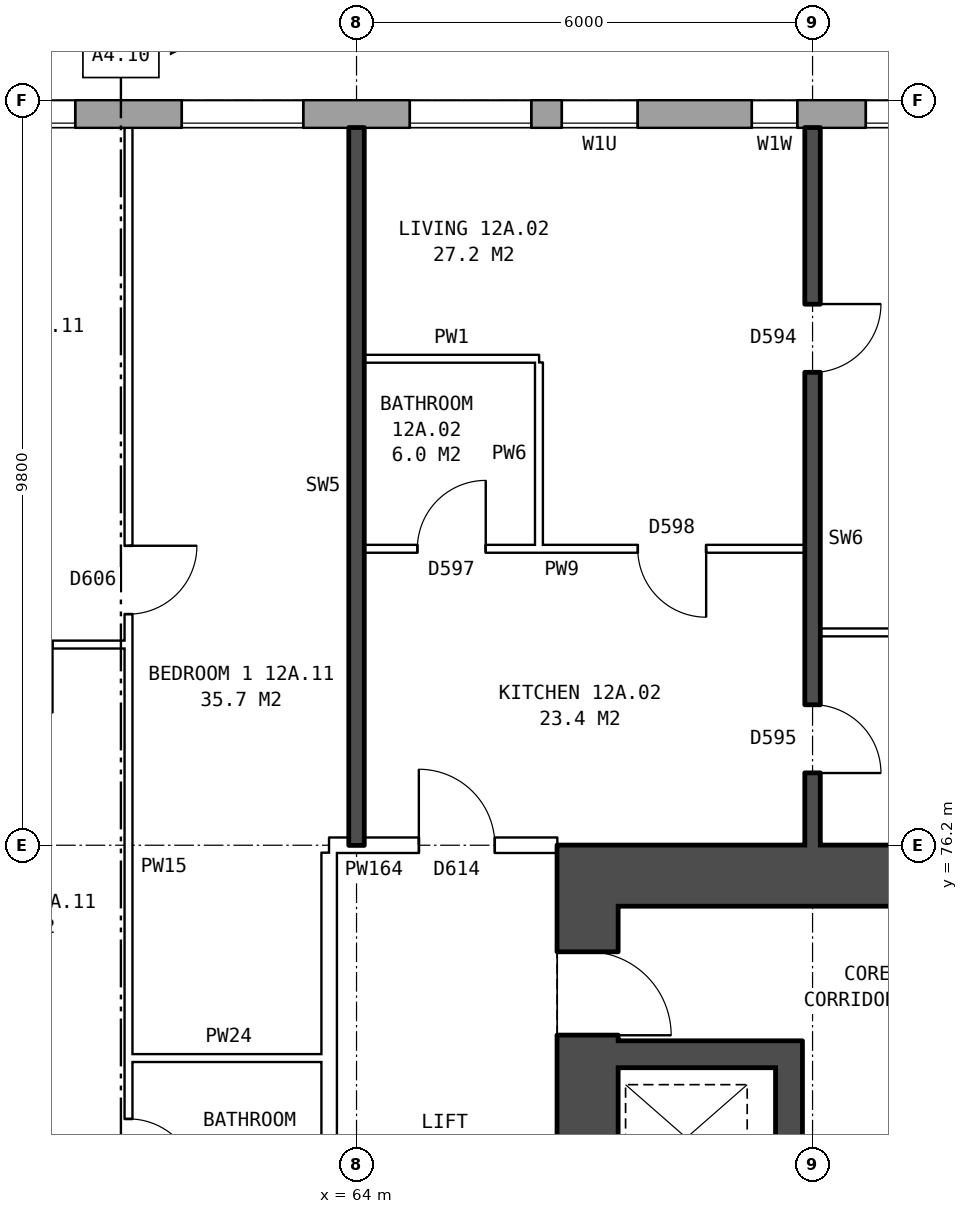
"""IFC4 building model, lengths in metres.
Left out: names, types, materials, properties, quantities, classifications, styles, units other than length and angle.
Written with IfcOpenShell. Run it as: python <this file> out.ifc"""

import sys

from ifc_helpers import new_model, si_unit, direction, frame, frame_2d, origin, place, context, subcontext, project, spatial, rectangle, extrude, element, fill, save


model = new_model("IFC4")
c1 = context("Model", 3, precision=1e-05, world=origin(), true_north=direction((0.0, 1.0)))
c2 = subcontext(c1, "Body", "Model", "MODEL_VIEW")
j1 = project(units=[si_unit("LENGTHUNIT", "METRE"), si_unit("PLANEANGLEUNIT", "RADIAN")], contexts=[c1])
p1 = place(None, origin())
s1 = spatial("IfcSite", under=j1, at=p1, CompositionType="ELEMENT")
p2 = place(p1, origin())
s2 = spatial("IfcBuilding", under=s1, at=p2, CompositionType="ELEMENT")
p3 = place(p2, frame((0.0, 0.0, 47.4)))
s3 = spatial("IfcBuildingStorey", under=s2, at=p3, CompositionType="ELEMENT", Elevation=47.4)
p4 = place(p3, frame((72.925, 85.82, 0.0), z_axis=(0.0, 0.0, 1.0), x_axis=(-1.0, 0.0, 0.0)))
e1 = element("IfcWall", 1, at=p4, inside=s3, PredefinedType="STANDARD", context=c2, shape_type="SweptSolid", body=[
    extrude(rectangle(XDim=48.351, YDim=0.36, at=frame_2d((24.175, 0.0))), origin(), (0.0, 0.0, 1.0), 2.85),
])
p5 = place(p4, frame((0.625, 0.0, 0.8)))
e2 = element("IfcOpeningElement", 2, at=p5, cuts=e1, PredefinedType="OPENING", context=c2, shape_type="SweptSolid", body=[
    extrude(rectangle(XDim=1.6, YDim=1.8, at=frame_2d((0.8, 0.9))), frame((0.0, 0.19, 0.0), z_axis=(0.0, -1.0, 0.0), x_axis=(1.0, 0.0, 0.0)), (0.0, 0.0, 1.0), 0.38),
])
p6 = place(p4, frame((3.125, 0.0, 1.7)))
e3 = element("IfcOpeningElement", 3, at=p6, cuts=e1, PredefinedType="OPENING", context=c2, shape_type="SweptSolid", body=[
    extrude(rectangle(XDim=0.6, YDim=0.9, at=frame_2d((0.3, 0.45))), frame((0.0, 0.19, 0.0), z_axis=(0.0, -1.0, 0.0), x_axis=(1.0, 0.0, 0.0)), (0.0, 0.0, 1.0), 0.38),
])
p7 = place(p4, frame((6.625, 0.0, 0.8)))
e4 = element("IfcOpeningElement", 4, at=p7, cuts=e1, PredefinedType="OPENING", context=c2, shape_type="SweptSolid", body=[
    extrude(rectangle(XDim=1.6, YDim=1.8, at=frame_2d((0.8, 0.9))), frame((0.0, 0.19, 0.0), z_axis=(0.0, -1.0, 0.0), x_axis=(1.0, 0.0, 0.0)), (0.0, 0.0, 1.0), 0.38),
])
p8 = place(p4, frame((9.625, 0.0, 0.8)))
e5 = element("IfcOpeningElement", 5, at=p8, cuts=e1, PredefinedType="OPENING", context=c2, shape_type="SweptSolid", body=[
    extrude(rectangle(XDim=1.6, YDim=1.8, at=frame_2d((0.8, 0.9))), frame((0.0, 0.19, 0.0), z_axis=(0.0, -1.0, 0.0), x_axis=(1.0, 0.0, 0.0)), (0.0, 0.0, 1.0), 0.38),
])
p9 = place(p4, frame((12.625, 0.0, 0.8)))
e6 = element("IfcOpeningElement", 6, at=p9, cuts=e1, PredefinedType="OPENING", context=c2, shape_type="SweptSolid", body=[
    extrude(rectangle(XDim=1.6, YDim=1.8, at=frame_2d((0.8, 0.9))), frame((0.0, 0.19, 0.0), z_axis=(0.0, -1.0, 0.0), x_axis=(1.0, 0.0, 0.0)), (0.0, 0.0, 1.0), 0.38),
])
p10 = place(p4, frame((15.625, 0.0, 0.8)))
e7 = element("IfcOpeningElement", 7, at=p10, cuts=e1, PredefinedType="OPENING", context=c2, shape_type="SweptSolid", body=[
    extrude(rectangle(XDim=1.6, YDim=1.8, at=frame_2d((0.8, 0.9))), frame((0.0, 0.19, 0.0), z_axis=(0.0, -1.0, 0.0), x_axis=(1.0, 0.0, 0.0)), (0.0, 0.0, 1.0), 0.38),
])
p11 = place(p4, frame((18.625, 0.0, 0.8)))
e8 = element("IfcOpeningElement", 8, at=p11, cuts=e1, PredefinedType="OPENING", context=c2, shape_type="SweptSolid", body=[
    extrude(rectangle(XDim=1.6, YDim=1.8, at=frame_2d((0.8, 0.9))), frame((0.0, 0.19, 0.0), z_axis=(0.0, -1.0, 0.0), x_axis=(1.0, 0.0, 0.0)), (0.0, 0.0, 1.0), 0.38),
])
p12 = place(p4, frame((21.625, 0.0, 0.8)))
e9 = element("IfcOpeningElement", 9, at=p12, cuts=e1, PredefinedType="OPENING", context=c2, shape_type="SweptSolid", body=[
    extrude(rectangle(XDim=1.6, YDim=1.8, at=frame_2d((0.8, 0.9))), frame((0.0, 0.19, 0.0), z_axis=(0.0, -1.0, 0.0), x_axis=(1.0, 0.0, 0.0)), (0.0, 0.0, 1.0), 0.38),
])
p13 = place(p4, frame((24.625, 0.0, 0.8)))
e10 = element("IfcOpeningElement", 10, at=p13, cuts=e1, PredefinedType="OPENING", context=c2, shape_type="SweptSolid", body=[
    extrude(rectangle(XDim=1.6, YDim=1.8, at=frame_2d((0.8, 0.9))), frame((0.0, 0.19, 0.0), z_axis=(0.0, -1.0, 0.0), x_axis=(1.0, 0.0, 0.0)), (0.0, 0.0, 1.0), 0.38),
])
p14 = place(p4, frame((27.625, 0.0, 0.8)))
e11 = element("IfcOpeningElement", 11, at=p14, cuts=e1, PredefinedType="OPENING", context=c2, shape_type="SweptSolid", body=[
    extrude(rectangle(XDim=1.6, YDim=1.8, at=frame_2d((0.8, 0.9))), frame((0.0, 0.19, 0.0), z_axis=(0.0, -1.0, 0.0), x_axis=(1.0, 0.0, 0.0)), (0.0, 0.0, 1.0), 0.38),
])
p15 = place(p4, frame((30.625, 0.0, 0.8)))
e12 = element("IfcOpeningElement", 12, at=p15, cuts=e1, PredefinedType="OPENING", context=c2, shape_type="SweptSolid", body=[
    extrude(rectangle(XDim=1.6, YDim=1.8, at=frame_2d((0.8, 0.9))), frame((0.0, 0.19, 0.0), z_axis=(0.0, -1.0, 0.0), x_axis=(1.0, 0.0, 0.0)), (0.0, 0.0, 1.0), 0.38),
])
p16 = place(p4, frame((33.625, 0.0, 0.8)))
e13 = element("IfcOpeningElement", 13, at=p16, cuts=e1, PredefinedType="OPENING", context=c2, shape_type="SweptSolid", body=[
    extrude(rectangle(XDim=1.6, YDim=1.8, at=frame_2d((0.8, 0.9))), frame((0.0, 0.19, 0.0), z_axis=(0.0, -1.0, 0.0), x_axis=(1.0, 0.0, 0.0)), (0.0, 0.0, 1.0), 0.38),
])
p17 = place(p4, frame((36.625, 0.0, 0.8)))
e14 = element("IfcOpeningElement", 14, at=p17, cuts=e1, PredefinedType="OPENING", context=c2, shape_type="SweptSolid", body=[
    extrude(rectangle(XDim=1.6, YDim=1.8, at=frame_2d((0.8, 0.9))), frame((0.0, 0.19, 0.0), z_axis=(0.0, -1.0, 0.0), x_axis=(1.0, 0.0, 0.0)), (0.0, 0.0, 1.0), 0.38),
])
p18 = place(p4, frame((39.625, 0.0, 0.8)))
e15 = element("IfcOpeningElement", 15, at=p18, cuts=e1, PredefinedType="OPENING", context=c2, shape_type="SweptSolid", body=[
    extrude(rectangle(XDim=1.6, YDim=1.8, at=frame_2d((0.8, 0.9))), frame((0.0, 0.19, 0.0), z_axis=(0.0, -1.0, 0.0), x_axis=(1.0, 0.0, 0.0)), (0.0, 0.0, 1.0), 0.38),
])
p19 = place(p4, frame((41.525, 0.0, 0.8)))
e16 = element("IfcOpeningElement", 16, at=p19, cuts=e1, PredefinedType="OPENING", context=c2, shape_type="SweptSolid", body=[
    extrude(rectangle(XDim=1.2, YDim=1.2, at=frame_2d((0.6, 0.6))), frame((0.0, 0.19, 0.0), z_axis=(0.0, -1.0, 0.0), x_axis=(1.0, 0.0, 0.0)), (0.0, 0.0, 1.0), 0.38),
])
p20 = place(p4, frame((45.625, 0.0, 0.8)))
e17 = element("IfcOpeningElement", 17, at=p20, cuts=e1, PredefinedType="OPENING", context=c2, shape_type="SweptSolid", body=[
    extrude(rectangle(XDim=1.6, YDim=1.8, at=frame_2d((0.8, 0.9))), frame((0.0, 0.19, 0.0), z_axis=(0.0, -1.0, 0.0), x_axis=(1.0, 0.0, 0.0)), (0.0, 0.0, 1.0), 0.38),
])
p21 = place(p4, frame((5.225, 0.0, 0.8)))
e18 = element("IfcOpeningElement", 18, at=p21, cuts=e1, PredefinedType="OPENING", context=c2, shape_type="SweptSolid", body=[
    extrude(rectangle(XDim=1.0, YDim=0.9, at=frame_2d((0.5, 0.45))), frame((0.0, 0.19, 0.0), z_axis=(0.0, -1.0, 0.0), x_axis=(1.0, 0.0, 0.0)), (0.0, 0.0, 1.0), 0.38),
])
p22 = place(p3, frame((67.04, 64.6, 0.0), z_axis=(0.0, 0.0, 1.0), x_axis=(0.0, 1.0, 0.0)))
e19 = element("IfcWall", 19, at=p22, inside=s3, PredefinedType="SHEAR", context=c2, shape_type="SweptSolid", body=[
    extrude(rectangle(XDim=10.8, YDim=0.8, at=frame_2d((5.4, 0.0))), origin(), (0.0, 0.0, 1.0), 2.85),
])
p23 = place(p22, frame((0.525, 0.0, 0.0)))
e20 = element("IfcOpeningElement", 20, at=p23, cuts=e19, PredefinedType="OPENING", context=c2, shape_type="SweptSolid", body=[
    extrude(rectangle(XDim=1.1, YDim=2.1, at=frame_2d((0.55, 1.05))), frame((0.0, 0.41, 0.0), z_axis=(0.0, -1.0, 0.0), x_axis=(1.0, 0.0, 0.0)), (0.0, 0.0, 1.0), 0.82),
])
p24 = place(p22, frame((9.1, 0.0, 0.0)))
e21 = element("IfcOpeningElement", 21, at=p24, cuts=e19, PredefinedType="OPENING", context=c2, shape_type="SweptSolid", body=[
    extrude(rectangle(XDim=1.1, YDim=2.1, at=frame_2d((0.55, 1.05))), frame((0.0, 0.41, 0.0), z_axis=(0.0, -1.0, 0.0), x_axis=(1.0, 0.0, 0.0)), (0.0, 0.0, 1.0), 0.82),
])
p25 = place(p3, frame((66.64, 75.8, 0.0), z_axis=(0.0, 0.0, 1.0), x_axis=(1.0, 0.0, 0.0)))
e22 = element("IfcWall", 22, at=p25, inside=s3, PredefinedType="SHEAR", context=c2, shape_type="SweptSolid", body=[
    extrude(rectangle(XDim=9.0, YDim=0.8, at=frame_2d((4.5, 0.0))), origin(), (0.0, 0.0, 1.0), 2.85),
])
p26 = place(p3, frame((67.44, 73.45, 0.0), z_axis=(0.0, 0.0, 1.0), x_axis=(1.0, 0.0, 0.0)))
e23 = element("IfcWall", 23, at=p26, inside=s3, PredefinedType="SHEAR", context=c2, shape_type="SweptSolid", body=[
    extrude(rectangle(XDim=2.075, YDim=0.35, at=frame_2d((1.038, 0.0))), origin(), (0.0, 0.0, 1.0), 2.85),
])
p27 = place(p3, frame((69.69, 67.025, 0.0), z_axis=(0.0, 0.0, 1.0), x_axis=(0.0, 1.0, 0.0)))
e24 = element("IfcWall", 24, at=p27, inside=s3, PredefinedType="SHEAR", context=c2, shape_type="SweptSolid", body=[
    extrude(rectangle(XDim=6.6, YDim=0.35, at=frame_2d((3.3, 0.0))), origin(), (0.0, 0.0, 1.0), 2.85),
])
p28 = place(p3, frame((63.64, 63.9, 0.0), z_axis=(0.0, 0.0, 1.0), x_axis=(0.0, 1.0, 0.0)))
e25 = element("IfcWall", 25, at=p28, inside=s3, PredefinedType="PARTITIONING", context=c2, shape_type="SweptSolid", body=[
    extrude(rectangle(XDim=12.2, YDim=0.2, at=frame_2d((6.1, 0.0))), origin(), (0.0, 0.0, 1.0), 2.85),
])
p29 = place(p28, frame((5.1, 0.0, 0.0)))
e26 = element("IfcOpeningElement", 26, at=p29, cuts=e25, PredefinedType="OPENING", context=c2, shape_type="SweptSolid", body=[
    extrude(rectangle(XDim=2.0, YDim=2.1, at=frame_2d((1.0, 1.05))), frame((0.0, 0.11, 0.0), z_axis=(0.0, -1.0, 0.0), x_axis=(1.0, 0.0, 0.0)), (0.0, 0.0, 1.0), 0.22),
])
p30 = place(p3, frame((61.0, 73.4, 0.0), z_axis=(0.0, 0.0, 1.0), x_axis=(1.0, 0.0, 0.0)))
e27 = element("IfcWall", 27, at=p30, inside=s3, PredefinedType="PARTITIONING", context=c2, shape_type="SweptSolid", body=[
    extrude(rectangle(XDim=2.64, YDim=0.1, at=frame_2d((1.32, 0.0))), origin(), (0.0, 0.0, 1.0), 2.85),
])
p31 = place(p3, frame((63.64, 76.2, 0.0), z_axis=(0.0, 0.0, 1.0), x_axis=(1.0, 0.0, 0.0)))
e28 = element("IfcWall", 28, at=p31, inside=s3, PredefinedType="PARTITIONING", context=c2, shape_type="SweptSolid", body=[
    extrude(rectangle(XDim=3.0, YDim=0.2, at=frame_2d((1.5, 0.0))), origin(), (0.0, 0.0, 1.0), 2.85),
])
p32 = place(p31, frame((1.18, 0.0, 0.0)))
e29 = element("IfcOpeningElement", 29, at=p32, cuts=e28, PredefinedType="OPENING", context=c2, shape_type="SweptSolid", body=[
    extrude(rectangle(XDim=1.0, YDim=2.1, at=frame_2d((0.5, 1.05))), frame((0.0, 0.11, 0.0), z_axis=(0.0, -1.0, 0.0), x_axis=(1.0, 0.0, 0.0)), (0.0, 0.0, 1.0), 0.22),
])
p33 = place(p3, frame((58.1, 78.84, 0.0), z_axis=(0.0, 0.0, 1.0), x_axis=(1.0, 0.0, 0.0)))
e30 = element("IfcWall", 30, at=p33, inside=s3, PredefinedType="PARTITIONING", context=c2, shape_type="SweptSolid", body=[
    extrude(rectangle(XDim=2.9, YDim=0.1, at=frame_2d((1.45, 0.0))), origin(), (0.0, 0.0, 1.0), 2.85),
])
p34 = place(p33, frame((1.0, 0.0, 0.0)))
e31 = element("IfcOpeningElement", 31, at=p34, cuts=e30, PredefinedType="OPENING", context=c2, shape_type="SweptSolid", body=[
    extrude(rectangle(XDim=0.9, YDim=2.1, at=frame_2d((0.45, 1.05))), frame((0.0, 0.06, 0.0), z_axis=(0.0, -1.0, 0.0), x_axis=(1.0, 0.0, 0.0)), (0.0, 0.0, 1.0), 0.12),
])
p35 = place(p3, frame((70.1, 79.0, 0.0), z_axis=(0.0, 0.0, 1.0), x_axis=(1.0, 0.0, 0.0)))
e32 = element("IfcWall", 32, at=p35, inside=s3, PredefinedType="PARTITIONING", context=c2, shape_type="SweptSolid", body=[
    extrude(rectangle(XDim=5.54, YDim=0.1, at=frame_2d((2.77, 0.0))), origin(), (0.0, 0.0, 1.0), 2.85),
])
p36 = place(p3, frame((64.1, 80.1, 0.0), z_axis=(0.0, 0.0, 1.0), x_axis=(1.0, 0.0, 0.0)))
e33 = element("IfcWall", 33, at=p36, inside=s3, PredefinedType="PARTITIONING", context=c2, shape_type="SweptSolid", body=[
    extrude(rectangle(XDim=5.8, YDim=0.1, at=frame_2d((2.9, 0.0))), origin(), (0.0, 0.0, 1.0), 2.85),
])
p37 = place(p36, frame((3.6, 0.0, 0.0)))
e34 = element("IfcOpeningElement", 34, at=p37, cuts=e33, PredefinedType="OPENING", context=c2, shape_type="SweptSolid", body=[
    extrude(rectangle(XDim=0.9, YDim=2.1, at=frame_2d((0.45, 1.05))), frame((0.0, 0.06, 0.0), z_axis=(0.0, -1.0, 0.0), x_axis=(1.0, 0.0, 0.0)), (0.0, 0.0, 1.0), 0.12),
])
p38 = place(p36, frame((0.7, 0.0, 0.0)))
e35 = element("IfcOpeningElement", 35, at=p38, cuts=e33, PredefinedType="OPENING", context=c2, shape_type="SweptSolid", body=[
    extrude(rectangle(XDim=0.9, YDim=2.1, at=frame_2d((0.45, 1.05))), frame((0.0, 0.06, 0.0), z_axis=(0.0, -1.0, 0.0), x_axis=(1.0, 0.0, 0.0)), (0.0, 0.0, 1.0), 0.12),
])
p39 = place(p3, frame((64.1, 82.6, 0.0), z_axis=(0.0, 0.0, 1.0), x_axis=(1.0, 0.0, 0.0)))
e36 = element("IfcWall", 36, at=p39, inside=s3, PredefinedType="PARTITIONING", context=c2, shape_type="SweptSolid", body=[
    extrude(rectangle(XDim=2.3, YDim=0.1, at=frame_2d((1.15, 0.0))), origin(), (0.0, 0.0, 1.0), 2.85),
])
p40 = place(p3, frame((61.0, 71.3, 0.0), z_axis=(0.0, 0.0, 1.0), x_axis=(0.0, 1.0, 0.0)))
e37 = element("IfcWall", 37, at=p40, inside=s3, PredefinedType="PARTITIONING", context=c2, shape_type="SweptSolid", body=[
    extrude(rectangle(XDim=14.34, YDim=0.1, at=frame_2d((7.17, 0.0))), origin(), (0.0, 0.0, 1.0), 2.85),
])
p41 = place(p40, frame((7.94, 0.0, 0.0)))
e38 = element("IfcOpeningElement", 38, at=p41, cuts=e37, PredefinedType="OPENING", context=c2, shape_type="SweptSolid", body=[
    extrude(rectangle(XDim=0.9, YDim=2.1, at=frame_2d((0.45, 1.05))), frame((0.0, 0.06, 0.0), z_axis=(0.0, -1.0, 0.0), x_axis=(1.0, 0.0, 0.0)), (0.0, 0.0, 1.0), 0.12),
])
p42 = place(p40, frame((0.4, 0.0, 0.0)))
e39 = element("IfcOpeningElement", 39, at=p42, cuts=e37, PredefinedType="OPENING", context=c2, shape_type="SweptSolid", body=[
    extrude(rectangle(XDim=0.9, YDim=2.1, at=frame_2d((0.45, 1.05))), frame((0.0, 0.06, 0.0), z_axis=(0.0, -1.0, 0.0), x_axis=(1.0, 0.0, 0.0)), (0.0, 0.0, 1.0), 0.12),
])
p43 = place(p3, frame((64.0, 76.2, 0.0), z_axis=(0.0, 0.0, 1.0), x_axis=(0.0, 1.0, 0.0)))
e40 = element("IfcWall", 40, at=p43, inside=s3, PredefinedType="SOLIDWALL", context=c2, shape_type="SweptSolid", body=[
    extrude(rectangle(XDim=9.44, YDim=0.2, at=frame_2d((4.72, 0.0))), origin(), (0.0, 0.0, 1.0), 2.85),
])
p44 = place(p3, frame((66.4, 80.15, 0.0), z_axis=(0.0, 0.0, 1.0), x_axis=(0.0, 1.0, 0.0)))
e41 = element("IfcWall", 41, at=p44, inside=s3, PredefinedType="PARTITIONING", context=c2, shape_type="SweptSolid", body=[
    extrude(rectangle(XDim=2.4, YDim=0.1, at=frame_2d((1.2, 0.0))), origin(), (0.0, 0.0, 1.0), 2.85),
])
p45 = place(p3, frame((70.0, 76.2, 0.0), z_axis=(0.0, 0.0, 1.0), x_axis=(0.0, 1.0, 0.0)))
e42 = element("IfcWall", 42, at=p45, inside=s3, PredefinedType="SOLIDWALL", context=c2, shape_type="SweptSolid", body=[
    extrude(rectangle(XDim=9.44, YDim=0.2, at=frame_2d((4.72, 0.0))), origin(), (0.0, 0.0, 1.0), 2.85),
])
p46 = place(p45, frame((6.22, 0.0, 0.0)))
e43 = element("IfcOpeningElement", 43, at=p46, cuts=e42, PredefinedType="OPENING", context=c2, shape_type="SweptSolid", body=[
    extrude(rectangle(XDim=0.9, YDim=2.1, at=frame_2d((0.45, 1.05))), frame((0.0, 0.11, 0.0), z_axis=(0.0, -1.0, 0.0), x_axis=(1.0, 0.0, 0.0)), (0.0, 0.0, 1.0), 0.22),
])
p47 = place(p45, frame((0.95, 0.0, 0.0)))
e44 = element("IfcOpeningElement", 44, at=p47, cuts=e42, PredefinedType="OPENING", context=c2, shape_type="SweptSolid", body=[
    extrude(rectangle(XDim=0.9, YDim=2.1, at=frame_2d((0.45, 1.05))), frame((0.0, 0.11, 0.0), z_axis=(0.0, -1.0, 0.0), x_axis=(1.0, 0.0, 0.0)), (0.0, 0.0, 1.0), 0.22),
])
p48 = place(p5, origin())
e45 = element("IfcWindow", 45, at=p48, inside=s3, PartitioningType="SINGLE_PANEL", PredefinedType="WINDOW", context=c2, shape_type="SweptSolid", body=[
    extrude(rectangle(XDim=1.6, YDim=1.8, at=frame_2d((0.8, 0.9))), frame((0.0, 0.15, 0.0), z_axis=(0.0, -1.0, 0.0), x_axis=(1.0, 0.0, 0.0)), (0.0, 0.0, 1.0), 0.06),
])
fill(e2, e45)
p49 = place(p6, origin())
e46 = element("IfcWindow", 46, at=p49, inside=s3, PartitioningType="SINGLE_PANEL", PredefinedType="WINDOW", context=c2, shape_type="SweptSolid", body=[
    extrude(rectangle(XDim=0.6, YDim=0.9, at=frame_2d((0.3, 0.45))), frame((0.0, 0.15, 0.0), z_axis=(0.0, -1.0, 0.0), x_axis=(1.0, 0.0, 0.0)), (0.0, 0.0, 1.0), 0.06),
])
fill(e3, e46)
p50 = place(p7, origin())
e47 = element("IfcWindow", 47, at=p50, inside=s3, PartitioningType="SINGLE_PANEL", PredefinedType="WINDOW", context=c2, shape_type="SweptSolid", body=[
    extrude(rectangle(XDim=1.6, YDim=1.8, at=frame_2d((0.8, 0.9))), frame((0.0, 0.15, 0.0), z_axis=(0.0, -1.0, 0.0), x_axis=(1.0, 0.0, 0.0)), (0.0, 0.0, 1.0), 0.06),
])
fill(e4, e47)
p51 = place(p8, origin())
e48 = element("IfcWindow", 48, at=p51, inside=s3, PartitioningType="SINGLE_PANEL", PredefinedType="WINDOW", context=c2, shape_type="SweptSolid", body=[
    extrude(rectangle(XDim=1.6, YDim=1.8, at=frame_2d((0.8, 0.9))), frame((0.0, 0.15, 0.0), z_axis=(0.0, -1.0, 0.0), x_axis=(1.0, 0.0, 0.0)), (0.0, 0.0, 1.0), 0.06),
])
fill(e5, e48)
p52 = place(p9, origin())
e49 = element("IfcWindow", 49, at=p52, inside=s3, PartitioningType="SINGLE_PANEL", PredefinedType="WINDOW", context=c2, shape_type="SweptSolid", body=[
    extrude(rectangle(XDim=1.6, YDim=1.8, at=frame_2d((0.8, 0.9))), frame((0.0, 0.15, 0.0), z_axis=(0.0, -1.0, 0.0), x_axis=(1.0, 0.0, 0.0)), (0.0, 0.0, 1.0), 0.06),
])
fill(e6, e49)
p53 = place(p24, frame((1.1, 0.0, 0.0), z_axis=(0.0, 0.0, 1.0), x_axis=(-1.0, 0.0, 0.0)))
e50 = element("IfcDoor", 50, at=p53, inside=s3, OperationType="SINGLE_SWING_RIGHT", PredefinedType="DOOR", context=c2, shape_type="SweptSolid", body=[
    extrude(rectangle(XDim=1.1, YDim=2.1, at=frame_2d((0.55, 1.05))), frame((0.0, 0.385, 0.0), z_axis=(0.0, -1.0, 0.0), x_axis=(1.0, 0.0, 0.0)), (0.0, 0.0, 1.0), 0.05),
])
fill(e21, e50)
p54 = place(p46, frame((0.9, 0.0, 0.0), z_axis=(0.0, 0.0, 1.0), x_axis=(-1.0, 0.0, 0.0)))
e51 = element("IfcDoor", 51, at=p54, inside=s3, OperationType="SINGLE_SWING_LEFT", PredefinedType="DOOR", context=c2, shape_type="SweptSolid", body=[
    extrude(rectangle(XDim=0.9, YDim=2.1, at=frame_2d((0.45, 1.05))), frame((0.0, 0.025, 0.0), z_axis=(0.0, -1.0, 0.0), x_axis=(1.0, 0.0, 0.0)), (0.0, 0.0, 1.0), 0.05),
])
fill(e43, e51)
p55 = place(p47, frame((0.9, 0.0, 0.0), z_axis=(0.0, 0.0, 1.0), x_axis=(-1.0, 0.0, 0.0)))
e52 = element("IfcDoor", 52, at=p55, inside=s3, OperationType="SINGLE_SWING_RIGHT", PredefinedType="DOOR", context=c2, shape_type="SweptSolid", body=[
    extrude(rectangle(XDim=0.9, YDim=2.1, at=frame_2d((0.45, 1.05))), frame((0.0, 0.025, 0.0), z_axis=(0.0, -1.0, 0.0), x_axis=(1.0, 0.0, 0.0)), (0.0, 0.0, 1.0), 0.05),
])
fill(e44, e52)
p56 = place(p32, origin())
e53 = element("IfcDoor", 53, at=p56, inside=s3, OperationType="SINGLE_SWING_LEFT", PredefinedType="DOOR", context=c2, shape_type="SweptSolid", body=[
    extrude(rectangle(XDim=1.0, YDim=2.1, at=frame_2d((0.5, 1.05))), frame((0.0, 0.025, 0.0), z_axis=(0.0, -1.0, 0.0), x_axis=(1.0, 0.0, 0.0)), (0.0, 0.0, 1.0), 0.05),
])
fill(e29, e53)
p57 = place(p37, frame((0.9, 0.0, 0.0), z_axis=(0.0, 0.0, 1.0), x_axis=(-1.0, 0.0, 0.0)))
e54 = element("IfcDoor", 54, at=p57, inside=s3, OperationType="SINGLE_SWING_LEFT", PredefinedType="DOOR", context=c2, shape_type="SweptSolid", body=[
    extrude(rectangle(XDim=0.9, YDim=2.1, at=frame_2d((0.45, 1.05))), frame((0.0, 0.025, 0.0), z_axis=(0.0, -1.0, 0.0), x_axis=(1.0, 0.0, 0.0)), (0.0, 0.0, 1.0), 0.05),
])
fill(e34, e54)
p58 = place(p38, origin())
e55 = element("IfcDoor", 55, at=p58, inside=s3, OperationType="SINGLE_SWING_RIGHT", PredefinedType="DOOR", context=c2, shape_type="SweptSolid", body=[
    extrude(rectangle(XDim=0.9, YDim=2.1, at=frame_2d((0.45, 1.05))), frame((0.0, 0.025, 0.0), z_axis=(0.0, -1.0, 0.0), x_axis=(1.0, 0.0, 0.0)), (0.0, 0.0, 1.0), 0.05),
])
fill(e35, e55)
p59 = place(p41, frame((0.9, 0.0, 0.0), z_axis=(0.0, 0.0, 1.0), x_axis=(-1.0, 0.0, 0.0)))
e56 = element("IfcDoor", 56, at=p59, inside=s3, OperationType="SINGLE_SWING_LEFT", PredefinedType="DOOR", context=c2, shape_type="SweptSolid", body=[
    extrude(rectangle(XDim=0.9, YDim=2.1, at=frame_2d((0.45, 1.05))), frame((0.0, 0.025, 0.0), z_axis=(0.0, -1.0, 0.0), x_axis=(1.0, 0.0, 0.0)), (0.0, 0.0, 1.0), 0.05),
])
fill(e38, e56)
p60 = place(p42, frame((0.9, 0.0, 0.0), z_axis=(0.0, 0.0, 1.0), x_axis=(-1.0, 0.0, 0.0)))
e57 = element("IfcDoor", 57, at=p60, inside=s3, OperationType="SINGLE_SWING_RIGHT", PredefinedType="DOOR", context=c2, shape_type="SweptSolid", body=[
    extrude(rectangle(XDim=0.9, YDim=2.1, at=frame_2d((0.45, 1.05))), frame((0.0, 0.025, 0.0), z_axis=(0.0, -1.0, 0.0), x_axis=(1.0, 0.0, 0.0)), (0.0, 0.0, 1.0), 0.05),
])
fill(e39, e57)
p61 = place(p21, origin())
e58 = element("IfcWindow", 58, at=p61, inside=s3, PartitioningType="SINGLE_PANEL", PredefinedType="WINDOW", context=c2, shape_type="SweptSolid", body=[
    extrude(rectangle(XDim=1.0, YDim=0.9, at=frame_2d((0.5, 0.45))), frame((0.0, 0.15, 0.0), z_axis=(0.0, -1.0, 0.0), x_axis=(1.0, 0.0, 0.0)), (0.0, 0.0, 1.0), 0.06),
])
fill(e18, e58)
save(model, sys.argv[1])
